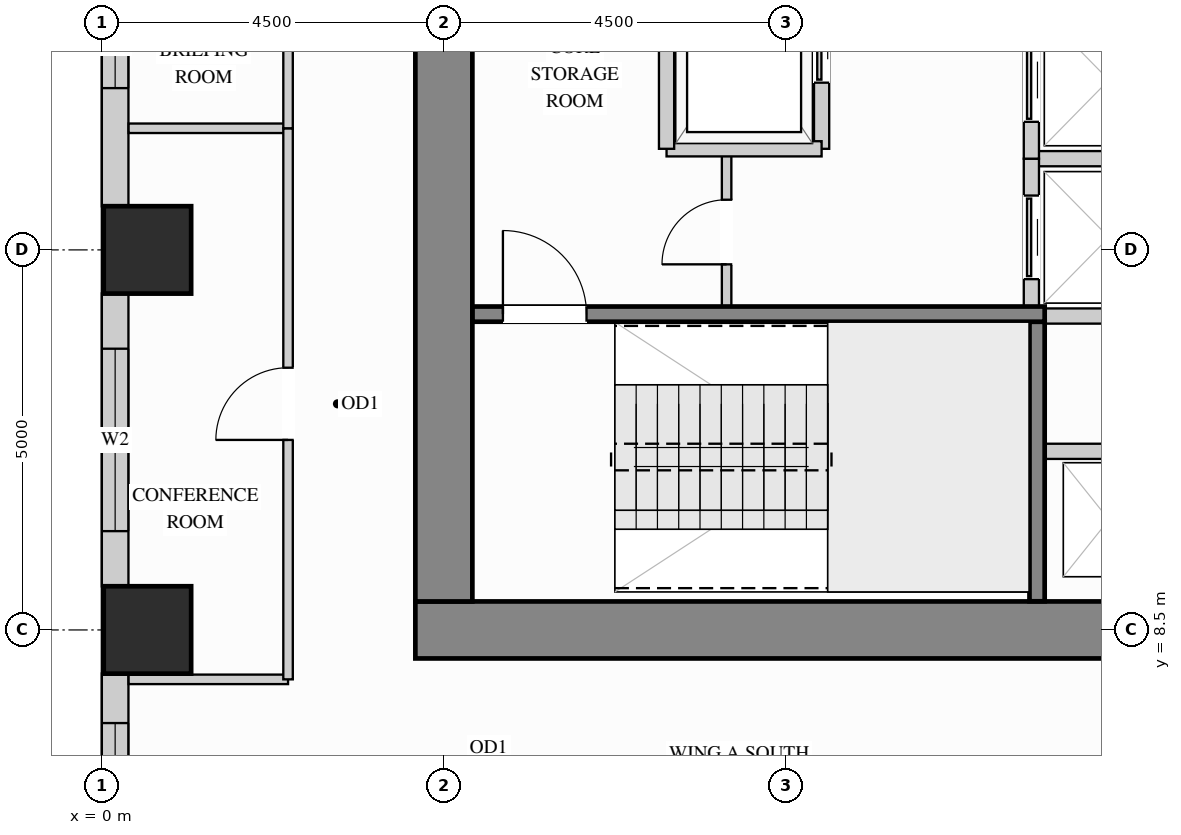
"""IFC4 building model, lengths in metres.
Left out: names, types, materials, properties, quantities, classifications, styles, units other than length and angle.
Written with IfcOpenShell. Run it as: python <this file> out.ifc"""

import sys

from ifc_helpers import new_model, si_unit, direction, frame, frame_2d, origin, origin_2d, place, context, subcontext, project, spatial, rectangle, extrude, source, transform, mapped, element, fill, save


model = new_model("IFC4")
c1 = context("Model", 3, precision=1e-05, world=origin(), true_north=direction((0.0, 1.0)))
c2 = subcontext(c1, "Body", "Model", "MODEL_VIEW")
j1 = project(units=[si_unit("LENGTHUNIT", "METRE"), si_unit("PLANEANGLEUNIT", "RADIAN")], contexts=[c1])
p1 = place(None, origin())
s1 = spatial("IfcSite", under=j1, at=p1, CompositionType="ELEMENT")
p2 = place(p1, origin())
s2 = spatial("IfcBuilding", under=s1, at=p2, CompositionType="ELEMENT")
p3 = place(p2, frame((0.0, 0.0, 106.2)))
s3 = spatial("IfcBuildingStorey", under=s2, at=p3, CompositionType="ELEMENT", Elevation=106.2)
m1 = source(origin(), c2, "Body", "SweptSolid", [
    extrude(rectangle(XDim=1.15, YDim=1.15, at=origin_2d()), origin(), (0.0, 0.0, 1.0), 3.38),
])
for number, where, z_axis, x_axis in (
    (1, (0.6, 13.5, 0.0), (0.0, 0.0, 1.0), (1.0, 0.0, 0.0)),
    (2, (0.6, 8.5, 0.0), (0.0, 0.0, 1.0), (1.0, 0.0, 0.0)),
):
    element("IfcColumn", number, at=place(p3, frame(where, z_axis=z_axis, x_axis=x_axis)), inside=s3, PredefinedType="COLUMN", context=c2, shape_type="MappedRepresentation", body=[
        mapped(m1, transform((0.0, 0.0, 0.0), x_axis=(1.0, 0.0, 0.0), y_axis=(0.0, 1.0, 0.0), z_axis=(0.0, 0.0, 1.0))),
    ])
m2 = source(origin(), c2, "Body", "SweptSolid", [
    extrude(rectangle(XDim=10.75, YDim=0.75, at=frame_2d((5.375, 0.0))), origin(), (0.0, 0.0, 1.0), 3.38),
])
p4 = place(p3, frame((4.125, 8.5, 0.0), z_axis=(0.0, 0.0, 1.0), x_axis=(1.0, 0.0, 0.0)))
e3 = element("IfcWall", 3, at=p4, inside=s3, PredefinedType="SHEAR", context=c2, shape_type="MappedRepresentation", body=[
    mapped(m2, transform((0.0, 0.0, 0.0), x_axis=(1.0, 0.0, 0.0), y_axis=(0.0, 1.0, 0.0), z_axis=(0.0, 0.0, 1.0))),
])
m3 = source(origin(), c2, "Body", "SweptSolid", [
    extrude(rectangle(XDim=20.25, YDim=0.75, at=frame_2d((10.125, 0.0))), origin(), (0.0, 0.0, 1.0), 3.38),
])
p5 = place(p3, frame((4.5, 8.875, 0.0), z_axis=(0.0, 0.0, 1.0), x_axis=(0.0, 1.0, 0.0)))
e4 = element("IfcWall", 4, at=p5, inside=s3, PredefinedType="SHEAR", context=c2, shape_type="MappedRepresentation", body=[
    mapped(m3, transform((0.0, 0.0, 0.0), x_axis=(1.0, 0.0, 0.0), y_axis=(0.0, 1.0, 0.0), z_axis=(0.0, 0.0, 1.0))),
])
p6 = place(p3, frame((0.175, 17.427, 0.0), z_axis=(0.0, 0.0, 1.0), x_axis=(0.0, -1.0, 0.0)))
e5 = element("IfcWall", 5, at=p6, inside=s3, PredefinedType="SOLIDWALL", context=c2, shape_type="SweptSolid", body=[
    extrude(rectangle(XDim=3.354, YDim=0.35, at=frame_2d((1.677, 0.0))), origin(), (0.0, 0.0, 1.0), 3.365),
])
p7 = place(p6, frame((0.598, 0.0, 0.78)))
e6 = element("IfcOpeningElement", 6, at=p7, cuts=e5, PredefinedType="OPENING", context=c2, shape_type="SweptSolid", body=[
    extrude(rectangle(XDim=1.2, YDim=2.1, at=frame_2d((0.6, 1.05))), frame((0.0, 0.185, 0.0), z_axis=(0.0, -1.0, 0.0), x_axis=(1.0, 0.0, 0.0)), (0.0, 0.0, 1.0), 0.37),
])
p8 = place(p3, frame((0.175, 12.927, 0.0), z_axis=(0.0, 0.0, 1.0), x_axis=(0.0, -1.0, 0.0)))
e7 = element("IfcWall", 7, at=p8, inside=s3, PredefinedType="SOLIDWALL", context=c2, shape_type="SweptSolid", body=[
    extrude(rectangle(XDim=3.854, YDim=0.35, at=frame_2d((1.927, 0.0))), origin(), (0.0, 0.0, 1.0), 3.365),
])
p9 = place(p8, frame((0.727, 0.0, 0.78)))
e8 = element("IfcOpeningElement", 8, at=p9, cuts=e7, PredefinedType="OPENING", context=c2, shape_type="SweptSolid", body=[
    extrude(rectangle(XDim=2.4, YDim=2.1, at=frame_2d((1.2, 1.05))), frame((0.0, 0.185, 0.0), z_axis=(0.0, -1.0, 0.0), x_axis=(1.0, 0.0, 0.0)), (0.0, 0.0, 1.0), 0.37),
])
p10 = place(p3, frame((0.175, 7.927, 0.0), z_axis=(0.0, 0.0, 1.0), x_axis=(0.0, -1.0, 0.0)))
e9 = element("IfcWall", 9, at=p10, inside=s3, PredefinedType="SOLIDWALL", context=c2, shape_type="SweptSolid", body=[
    extrude(rectangle(XDim=3.854, YDim=0.35, at=frame_2d((1.927, 0.0))), origin(), (0.0, 0.0, 1.0), 3.365),
])
p11 = place(p10, frame((0.652, 0.0, 0.78)))
e10 = element("IfcOpeningElement", 10, at=p11, cuts=e9, PredefinedType="OPENING", context=c2, shape_type="SweptSolid", body=[
    extrude(rectangle(XDim=1.2, YDim=2.1, at=frame_2d((0.6, 1.05))), frame((0.0, 0.185, 0.0), z_axis=(0.0, -1.0, 0.0), x_axis=(1.0, 0.0, 0.0)), (0.0, 0.0, 1.0), 0.37),
])
p12 = place(p3, frame((8.22, 12.75, 0.0), z_axis=(0.0, 0.0, 1.0), x_axis=(0.0, 1.0, 0.0)))
e11 = element("IfcWall", 11, at=p12, inside=s3, PredefinedType="PARTITIONING", context=c2, shape_type="SweptSolid", body=[
    extrude(rectangle(XDim=2.07, YDim=0.125, at=frame_2d((1.035, 0.0))), origin(), (0.0, 0.0, 1.0), 3.365),
])
p13 = place(p12, frame((0.56, 0.0, 0.0)))
e12 = element("IfcOpeningElement", 12, at=p13, cuts=e11, PredefinedType="OPENING", context=c2, shape_type="SweptSolid", body=[
    extrude(rectangle(XDim=0.85, YDim=2.1, at=frame_2d((0.425, 1.05))), frame((0.0, 0.073, 0.0), z_axis=(0.0, -1.0, 0.0), x_axis=(1.0, 0.0, 0.0)), (0.0, 0.0, 1.0), 0.145),
])
m4 = source(origin(), c2, "Body", "SweptSolid", [
    extrude(rectangle(XDim=2.098, YDim=0.125, at=frame_2d((1.049, 0.0))), origin(), (0.0, 0.0, 1.0), 3.365),
])
for number, where, z_axis, x_axis in (
    (13, (0.352, 7.85, 0.0), (0.0, 0.0, 1.0), (1.0, 0.0, 0.0)),
    (14, (0.352, 15.1, 0.0), (0.0, 0.0, 1.0), (1.0, 0.0, 0.0)),
):
    element("IfcWall", number, at=place(p3, frame(where, z_axis=z_axis, x_axis=x_axis)), inside=s3, PredefinedType="PARTITIONING", context=c2, shape_type="MappedRepresentation", body=[
        mapped(m4, transform((0.0, 0.0, 0.0), x_axis=(1.0, 0.0, 0.0), y_axis=(0.0, 1.0, 0.0), z_axis=(0.0, 0.0, 1.0))),
    ])
p14 = place(p3, frame((2.45, 7.85, 0.0), z_axis=(0.0, 0.0, 1.0), x_axis=(0.0, 1.0, 0.0)))
e15 = element("IfcWall", 15, at=p14, inside=s3, PredefinedType="PARTITIONING", context=c2, shape_type="SweptSolid", body=[
    extrude(rectangle(XDim=7.25, YDim=0.125, at=frame_2d((3.625, 0.0))), origin(), (0.0, 0.0, 1.0), 3.365),
])
p15 = place(p14, frame((3.15, 0.0, 0.0)))
e16 = element("IfcOpeningElement", 16, at=p15, cuts=e15, PredefinedType="OPENING", context=c2, shape_type="SweptSolid", body=[
    extrude(rectangle(XDim=0.95, YDim=2.15, at=frame_2d((0.475, 1.075))), frame((0.0, 0.073, 0.0), z_axis=(0.0, -1.0, 0.0), x_axis=(1.0, 0.0, 0.0)), (0.0, 0.0, 1.0), 0.145),
])
p16 = place(p3, frame((2.45, 15.1, 0.0), z_axis=(0.0, 0.0, 1.0), x_axis=(0.0, 1.0, 0.0)))
e17 = element("IfcWall", 17, at=p16, inside=s3, PredefinedType="PARTITIONING", context=c2, shape_type="SweptSolid", body=[
    extrude(rectangle(XDim=7.5, YDim=0.125, at=frame_2d((3.75, 0.0))), origin(), (0.0, 0.0, 1.0), 3.365),
])
p17 = place(p16, frame((3.275, 0.0, 0.0)))
e18 = element("IfcOpeningElement", 18, at=p17, cuts=e17, PredefinedType="OPENING", context=c2, shape_type="SweptSolid", body=[
    extrude(rectangle(XDim=0.95, YDim=2.15, at=frame_2d((0.475, 1.075))), frame((0.0, 0.073, 0.0), z_axis=(0.0, -1.0, 0.0), x_axis=(1.0, 0.0, 0.0)), (0.0, 0.0, 1.0), 0.145),
])
m5 = source(origin(), c2, "Body", "SweptSolid", [
    extrude(rectangle(XDim=1.63, YDim=0.2, at=frame_2d((0.815, 0.0))), origin(), (0.0, 0.0, 1.0), 3.365),
])
p18 = place(p3, frame((12.42, 10.85, 0.0), z_axis=(0.0, 0.0, 1.0), x_axis=(1.0, 0.0, 0.0)))
e19 = element("IfcWall", 19, at=p18, inside=s3, PredefinedType="PARTITIONING", context=c2, shape_type="MappedRepresentation", body=[
    mapped(m5, transform((0.0, 0.0, 0.0), x_axis=(1.0, 0.0, 0.0), y_axis=(0.0, 1.0, 0.0), z_axis=(0.0, 0.0, 1.0))),
])
m6 = source(origin(), c2, "Body", "SweptSolid", [
    extrude(rectangle(XDim=1.865, YDim=0.2, at=frame_2d((0.933, 0.0))), origin(), (0.0, 0.0, 1.0), 3.365),
])
for number, where, z_axis, x_axis in (
    (20, (12.23, 14.7, 0.0), (0.0, 0.0, 1.0), (1.0, 0.0, 0.0)),
    (21, (12.23, 12.63, 0.0), (0.0, 0.0, 1.0), (1.0, 0.0, 0.0)),
):
    element("IfcWall", number, at=place(p3, frame(where, z_axis=z_axis, x_axis=x_axis)), inside=s3, PredefinedType="PARTITIONING", context=c2, shape_type="MappedRepresentation", body=[
        mapped(m6, transform((0.0, 0.0, 0.0), x_axis=(1.0, 0.0, 0.0), y_axis=(0.0, 1.0, 0.0), z_axis=(0.0, 0.0, 1.0))),
    ])
p19 = place(p3, frame((12.23, 12.63, 0.0), z_axis=(0.0, 0.0, 1.0), x_axis=(0.0, 1.0, 0.0)))
e22 = element("IfcWall", 22, at=p19, inside=s3, PredefinedType="PARTITIONING", context=c2, shape_type="SweptSolid", body=[
    extrude(rectangle(XDim=2.07, YDim=0.2, at=frame_2d((1.035, 0.0))), origin(), (0.0, 0.0, 1.0), 3.365),
])
p20 = place(p19, frame((0.485, 0.0, 0.0)))
e23 = element("IfcOpeningElement", 23, at=p20, cuts=e22, PredefinedType="OPENING", context=c2, shape_type="SweptSolid", body=[
    extrude(rectangle(XDim=1.1, YDim=2.2, at=frame_2d((0.55, 1.1))), frame((0.0, 0.11, 0.0), z_axis=(0.0, -1.0, 0.0), x_axis=(1.0, 0.0, 0.0)), (0.0, 0.0, 1.0), 0.22),
])
p21 = place(p3, frame((12.23, 14.7, 0.0), z_axis=(0.0, 0.0, 1.0), x_axis=(0.0, 1.0, 0.0)))
e24 = element("IfcWall", 24, at=p21, inside=s3, PredefinedType="PARTITIONING", context=c2, shape_type="SweptSolid", body=[
    extrude(rectangle(XDim=2.07, YDim=0.2, at=frame_2d((1.035, 0.0))), origin(), (0.0, 0.0, 1.0), 3.365),
])
p22 = place(p21, frame((0.485, 0.0, 0.0)))
e25 = element("IfcOpeningElement", 25, at=p22, cuts=e24, PredefinedType="OPENING", context=c2, shape_type="SweptSolid", body=[
    extrude(rectangle(XDim=1.1, YDim=2.2, at=frame_2d((0.55, 1.1))), frame((0.0, 0.11, 0.0), z_axis=(0.0, -1.0, 0.0), x_axis=(1.0, 0.0, 0.0)), (0.0, 0.0, 1.0), 0.22),
])
p23 = place(p3, frame((9.47, 14.83, 0.0), z_axis=(0.0, 0.0, 1.0), x_axis=(0.0, 1.0, 0.0)))
e26 = element("IfcWall", 26, at=p23, inside=s3, PredefinedType="PARTITIONING", context=c2, shape_type="SweptSolid", body=[
    extrude(rectangle(XDim=2.84, YDim=0.2, at=frame_2d((1.42, 0.0))), origin(), (0.0, 0.0, 1.0), 3.365),
])
p24 = place(p23, frame((0.87, 0.0, 0.0)))
e27 = element("IfcOpeningElement", 27, at=p24, cuts=e26, PredefinedType="OPENING", context=c2, shape_type="SweptSolid", body=[
    extrude(rectangle(XDim=1.1, YDim=2.2, at=frame_2d((0.55, 1.1))), frame((0.0, 0.11, 0.0), z_axis=(0.0, -1.0, 0.0), x_axis=(1.0, 0.0, 0.0)), (0.0, 0.0, 1.0), 0.22),
])
m7 = source(origin(), c2, "Body", "SweptSolid", [
    extrude(rectangle(XDim=2.04, YDim=0.2, at=frame_2d((1.02, 0.0))), origin(), (0.0, 0.0, 1.0), 3.365),
])
p25 = place(p3, frame((7.43, 14.83, 0.0), z_axis=(0.0, 0.0, 1.0), x_axis=(1.0, 0.0, 0.0)))
e28 = element("IfcWall", 28, at=p25, inside=s3, PredefinedType="PARTITIONING", context=c2, shape_type="MappedRepresentation", body=[
    mapped(m7, transform((0.0, 0.0, 0.0), x_axis=(1.0, 0.0, 0.0), y_axis=(0.0, 1.0, 0.0), z_axis=(0.0, 0.0, 1.0))),
])
m8 = source(origin(), c2, "Body", "SweptSolid", [
    extrude(rectangle(XDim=2.84, YDim=0.2, at=frame_2d((1.42, 0.0))), origin(), (0.0, 0.0, 1.0), 3.365),
])
p26 = place(p3, frame((7.43, 14.83, 0.0), z_axis=(0.0, 0.0, 1.0), x_axis=(0.0, 1.0, 0.0)))
e29 = element("IfcWall", 29, at=p26, inside=s3, PredefinedType="PARTITIONING", context=c2, shape_type="MappedRepresentation", body=[
    mapped(m8, transform((0.0, 0.0, 0.0), x_axis=(1.0, 0.0, 0.0), y_axis=(0.0, 1.0, 0.0), z_axis=(0.0, 0.0, 1.0))),
])
m9 = source(origin(), c2, "Body", "SweptSolid", [
    extrude(rectangle(XDim=3.678, YDim=0.2, at=frame_2d((1.839, 0.0))), origin(), (0.0, 0.0, 1.0), 3.38),
])
p27 = place(p3, frame((12.305, 8.877, 0.0), z_axis=(0.0, 0.0, 1.0), x_axis=(0.0, 1.0, 0.0)))
e30 = element("IfcWall", 30, at=p27, inside=s3, PredefinedType="SHEAR", context=c2, shape_type="MappedRepresentation", body=[
    mapped(m9, transform((0.0, 0.0, 0.0), x_axis=(1.0, 0.0, 0.0), y_axis=(0.0, 1.0, 0.0), z_axis=(0.0, 0.0, 1.0))),
])
p28 = place(p3, frame((4.877, 12.655, 0.0), z_axis=(0.0, 0.0, 1.0), x_axis=(1.0, 0.0, 0.0)))
e31 = element("IfcWall", 31, at=p28, inside=s3, PredefinedType="SHEAR", context=c2, shape_type="SweptSolid", body=[
    extrude(rectangle(XDim=7.528, YDim=0.2, at=frame_2d((3.764, 0.0))), origin(), (0.0, 0.0, 1.0), 3.38),
])
p29 = place(p28, frame((0.4, 0.0, 0.0)))
e32 = element("IfcOpeningElement", 32, at=p29, cuts=e31, PredefinedType="OPENING", context=c2, shape_type="SweptSolid", body=[
    extrude(rectangle(XDim=1.1, YDim=2.15, at=frame_2d((0.55, 1.075))), frame((0.0, 0.11, 0.0), z_axis=(0.0, -1.0, 0.0), x_axis=(1.0, 0.0, 0.0)), (0.0, 0.0, 1.0), 0.22),
])
m10 = source(origin(), c2, "Body", "SweptSolid", [
    extrude(rectangle(XDim=1.1, YDim=2.2, at=frame_2d((0.55, 1.1))), frame((0.0, 0.025, 0.0), z_axis=(0.0, -1.0, 0.0), x_axis=(1.0, 0.0, 0.0)), (0.0, 0.0, 1.0), 0.05),
])
p30 = place(p20, origin())
e33 = element("IfcDoor", 33, at=p30, inside=s3, OperationType="SLIDING_TO_LEFT", PredefinedType="DOOR", context=c2, shape_type="MappedRepresentation", body=[
    mapped(m10, transform((0.0, 0.0, 0.0), x_axis=(1.0, 0.0, 0.0), y_axis=(0.0, 1.0, 0.0), z_axis=(0.0, 0.0, 1.0))),
])
fill(e23, e33)
p31 = place(p22, origin())
e34 = element("IfcDoor", 34, at=p31, inside=s3, OperationType="SLIDING_TO_LEFT", PredefinedType="DOOR", context=c2, shape_type="MappedRepresentation", body=[
    mapped(m10, transform((0.0, 0.0, 0.0), x_axis=(1.0, 0.0, 0.0), y_axis=(0.0, 1.0, 0.0), z_axis=(0.0, 0.0, 1.0))),
])
fill(e25, e34)
p32 = place(p24, origin())
e35 = element("IfcDoor", 35, at=p32, inside=s3, OperationType="SLIDING_TO_LEFT", PredefinedType="DOOR", context=c2, shape_type="MappedRepresentation", body=[
    mapped(m10, transform((0.0, 0.0, 0.0), x_axis=(1.0, 0.0, 0.0), y_axis=(0.0, 1.0, 0.0), z_axis=(0.0, 0.0, 1.0))),
])
fill(e27, e35)
m11 = source(origin(), c2, "Body", "SweptSolid", [
    extrude(rectangle(XDim=0.95, YDim=2.15, at=frame_2d((0.475, 1.075))), frame((0.0, 0.025, 0.0), z_axis=(0.0, -1.0, 0.0), x_axis=(1.0, 0.0, 0.0)), (0.0, 0.0, 1.0), 0.05),
])
p33 = place(p15, origin())
e36 = element("IfcDoor", 36, at=p33, inside=s3, OperationType="SINGLE_SWING_LEFT", PredefinedType="DOOR", context=c2, shape_type="MappedRepresentation", body=[
    mapped(m11, transform((0.0, 0.0, 0.0), x_axis=(1.0, 0.0, 0.0), y_axis=(0.0, 1.0, 0.0), z_axis=(0.0, 0.0, 1.0))),
])
fill(e16, e36)
m12 = source(origin(), c2, "Body", "SweptSolid", [
    extrude(rectangle(XDim=0.85, YDim=2.1, at=frame_2d((0.425, 1.05))), frame((0.0, 0.025, 0.0), z_axis=(0.0, -1.0, 0.0), x_axis=(1.0, 0.0, 0.0)), (0.0, 0.0, 1.0), 0.05),
])
p34 = place(p13, origin())
e37 = element("IfcDoor", 37, at=p34, inside=s3, OperationType="SINGLE_SWING_LEFT", PredefinedType="DOOR", context=c2, shape_type="MappedRepresentation", body=[
    mapped(m12, transform((0.0, 0.0, 0.0), x_axis=(1.0, 0.0, 0.0), y_axis=(0.0, 1.0, 0.0), z_axis=(0.0, 0.0, 1.0))),
])
fill(e12, e37)
m13 = source(origin(), c2, "Body", "SweptSolid", [
    extrude(rectangle(XDim=1.1, YDim=2.15, at=frame_2d((0.55, 1.075))), frame((0.0, 0.025, 0.0), z_axis=(0.0, -1.0, 0.0), x_axis=(1.0, 0.0, 0.0)), (0.0, 0.0, 1.0), 0.05),
])
p35 = place(p29, origin())
e38 = element("IfcDoor", 38, at=p35, inside=s3, OperationType="SINGLE_SWING_LEFT", PredefinedType="DOOR", context=c2, shape_type="MappedRepresentation", body=[
    mapped(m13, transform((0.0, 0.0, 0.0), x_axis=(1.0, 0.0, 0.0), y_axis=(0.0, 1.0, 0.0), z_axis=(0.0, 0.0, 1.0))),
])
fill(e32, e38)
m14 = source(origin(), c2, "Body", "SweptSolid", [
    extrude(rectangle(XDim=2.4, YDim=2.1, at=frame_2d((1.2, 1.05))), frame((0.0, 0.03, 0.0), z_axis=(0.0, -1.0, 0.0), x_axis=(1.0, 0.0, 0.0)), (0.0, 0.0, 1.0), 0.06),
])
p36 = place(p9, origin())
e39 = element("IfcWindow", 39, at=p36, inside=s3, PartitioningType="SINGLE_PANEL", PredefinedType="WINDOW", context=c2, shape_type="MappedRepresentation", body=[
    mapped(m14, transform((0.0, 0.0, 0.0), x_axis=(1.0, 0.0, 0.0), y_axis=(0.0, 1.0, 0.0), z_axis=(0.0, 0.0, 1.0))),
])
fill(e8, e39)
m15 = source(origin(), c2, "Body", "SweptSolid", [
    extrude(rectangle(XDim=1.2, YDim=2.1, at=frame_2d((0.6, 1.05))), frame((0.0, 0.03, 0.0), z_axis=(0.0, -1.0, 0.0), x_axis=(1.0, 0.0, 0.0)), (0.0, 0.0, 1.0), 0.06),
])
p37 = place(p7, origin())
e40 = element("IfcWindow", 40, at=p37, inside=s3, PartitioningType="SINGLE_PANEL", PredefinedType="WINDOW", context=c2, shape_type="MappedRepresentation", body=[
    mapped(m15, transform((0.0, 0.0, 0.0), x_axis=(1.0, 0.0, 0.0), y_axis=(0.0, 1.0, 0.0), z_axis=(0.0, 0.0, 1.0))),
])
fill(e6, e40)
p38 = place(p11, origin())
e41 = element("IfcWindow", 41, at=p38, inside=s3, PartitioningType="SINGLE_PANEL", PredefinedType="WINDOW", context=c2, shape_type="MappedRepresentation", body=[
    mapped(m15, transform((0.0, 0.0, 0.0), x_axis=(1.0, 0.0, 0.0), y_axis=(0.0, 1.0, 0.0), z_axis=(0.0, 0.0, 1.0))),
])
fill(e10, e41)
save(model, sys.argv[1])
